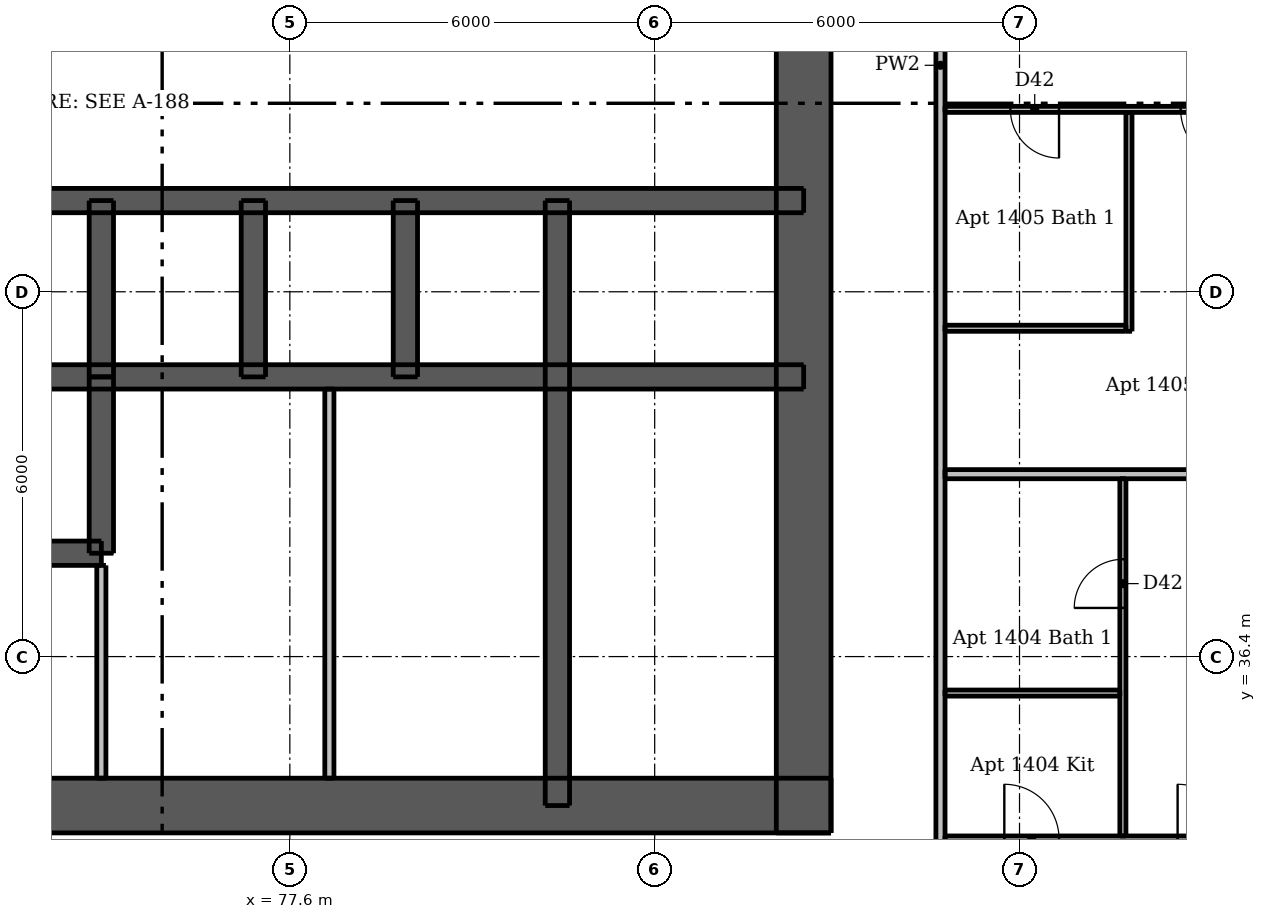
"""IFC4 building model, lengths in metres.
Left out: names, types, materials, properties, quantities, classifications, styles, units other than length and angle.
Written with IfcOpenShell. Run it as: python <this file> out.ifc"""

import sys

from ifc_helpers import new_model, si_unit, direction, frame, frame_2d, origin, place, context, subcontext, project, spatial, rectangle, extrude, element, fill, save


model = new_model("IFC4")
c1 = context("Model", 3, precision=1e-05, world=origin(), true_north=direction((0.0, 1.0)))
c2 = subcontext(c1, "Body", "Model", "MODEL_VIEW")
j1 = project(units=[si_unit("LENGTHUNIT", "METRE"), si_unit("PLANEANGLEUNIT", "RADIAN")], contexts=[c1])
p1 = place(None, origin())
s1 = spatial("IfcSite", under=j1, at=p1, CompositionType="ELEMENT")
p2 = place(p1, origin())
s2 = spatial("IfcBuilding", under=s1, at=p2, CompositionType="ELEMENT")
p3 = place(p2, frame((0.0, 0.0, 53.2)))
s3 = spatial("IfcBuildingStorey", under=s2, at=p3, CompositionType="ELEMENT", Elevation=53.2)
p4 = place(p3, frame((62.5, 33.95, 0.0), z_axis=(0.0, 0.0, 1.0), x_axis=(1.0, 0.0, 0.0)))
e1 = element("IfcWall", 1, at=p4, inside=s3, PredefinedType="SHEAR", context=c2, shape_type="SweptSolid", body=[
    extrude(rectangle(XDim=24.0, YDim=0.9, at=frame_2d((12.0, 0.0))), origin(), (0.0, 0.0, 1.0), 3.05),
])
p5 = place(p4, frame((2.05, 0.0, 0.0)))
e2 = element("IfcOpeningElement", 2, at=p5, cuts=e1, PredefinedType="OPENING", context=c2, shape_type="SweptSolid", body=[
    extrude(rectangle(XDim=1.1, YDim=2.1, at=frame_2d((0.55, 1.05))), frame((0.0, 0.46, 0.0), z_axis=(0.0, -1.0, 0.0), x_axis=(1.0, 0.0, 0.0)), (0.0, 0.0, 1.0), 0.92),
])
p6 = place(p4, frame((20.85, 0.0, 0.0)))
e3 = element("IfcOpeningElement", 3, at=p6, cuts=e1, PredefinedType="OPENING", context=c2, shape_type="SweptSolid", body=[
    extrude(rectangle(XDim=1.1, YDim=2.1, at=frame_2d((0.55, 1.05))), frame((0.0, 0.46, 0.0), z_axis=(0.0, -1.0, 0.0), x_axis=(1.0, 0.0, 0.0)), (0.0, 0.0, 1.0), 0.92),
])
p7 = place(p4, frame((8.0, 0.0, 0.0)))
e4 = element("IfcOpeningElement", 4, at=p7, cuts=e1, PredefinedType="OPENING", context=c2, shape_type="SweptSolid", body=[
    extrude(rectangle(XDim=1.1, YDim=2.1, at=frame_2d((0.55, 1.05))), frame((0.0, 0.46, 0.0), z_axis=(0.0, -1.0, 0.0), x_axis=(1.0, 0.0, 0.0)), (0.0, 0.0, 1.0), 0.92),
])
p8 = place(p4, frame((13.525, 0.0, 0.0)))
e5 = element("IfcOpeningElement", 5, at=p8, cuts=e1, PredefinedType="OPENING", context=c2, shape_type="SweptSolid", body=[
    extrude(rectangle(XDim=0.9, YDim=2.1, at=frame_2d((0.45, 1.05))), frame((0.0, 0.46, 0.0), z_axis=(0.0, -1.0, 0.0), x_axis=(1.0, 0.0, 0.0)), (0.0, 0.0, 1.0), 0.92),
])
p9 = place(p4, frame((17.075, 0.0, 0.0)))
e6 = element("IfcOpeningElement", 6, at=p9, cuts=e1, PredefinedType="OPENING", context=c2, shape_type="SweptSolid", body=[
    extrude(rectangle(XDim=0.9, YDim=2.1, at=frame_2d((0.45, 1.05))), frame((0.0, 0.46, 0.0), z_axis=(0.0, -1.0, 0.0), x_axis=(1.0, 0.0, 0.0)), (0.0, 0.0, 1.0), 0.92),
])
p10 = place(p3, frame((86.05, 33.5, 0.0), z_axis=(0.0, 0.0, 1.0), x_axis=(0.0, 1.0, 0.0)))
e7 = element("IfcWall", 7, at=p10, inside=s3, PredefinedType="SHEAR", context=c2, shape_type="SweptSolid", body=[
    extrude(rectangle(XDim=24.0, YDim=0.9, at=frame_2d((12.0, 0.0))), origin(), (0.0, 0.0, 1.0), 3.05),
])
p11 = place(p10, frame((11.2, 0.0, 0.0)))
e8 = element("IfcOpeningElement", 8, at=p11, cuts=e7, PredefinedType="OPENING", context=c2, shape_type="SweptSolid", body=[
    extrude(rectangle(XDim=1.6, YDim=2.1, at=frame_2d((0.8, 1.05))), frame((0.0, 0.46, 0.0), z_axis=(0.0, -1.0, 0.0), x_axis=(1.0, 0.0, 0.0)), (0.0, 0.0, 1.0), 0.92),
])
p12 = place(p3, frame((62.95, 41.0, 0.0), z_axis=(0.0, 0.0, 1.0), x_axis=(1.0, 0.0, 0.0)))
e9 = element("IfcWall", 9, at=p12, inside=s3, PredefinedType="SHEAR", context=c2, shape_type="SweptSolid", body=[
    extrude(rectangle(XDim=23.1, YDim=0.4, at=frame_2d((11.55, 0.0))), origin(), (0.0, 0.0, 1.0), 3.05),
])
p13 = place(p3, frame((62.95, 43.9, 0.0), z_axis=(0.0, 0.0, 1.0), x_axis=(1.0, 0.0, 0.0)))
e10 = element("IfcWall", 10, at=p13, inside=s3, PredefinedType="SHEAR", context=c2, shape_type="SweptSolid", body=[
    extrude(rectangle(XDim=23.1, YDim=0.4, at=frame_2d((11.55, 0.0))), origin(), (0.0, 0.0, 1.0), 3.05),
])
p14 = place(p13, frame((1.7, 0.0, 0.0)))
e11 = element("IfcOpeningElement", 11, at=p14, cuts=e10, PredefinedType="OPENING", context=c2, shape_type="SweptSolid", body=[
    extrude(rectangle(XDim=0.9, YDim=2.1, at=frame_2d((0.45, 1.05))), frame((0.0, 0.21, 0.0), z_axis=(0.0, -1.0, 0.0), x_axis=(1.0, 0.0, 0.0)), (0.0, 0.0, 1.0), 0.42),
])
p15 = place(p13, frame((20.5, 0.0, 0.0)))
e12 = element("IfcOpeningElement", 12, at=p15, cuts=e10, PredefinedType="OPENING", context=c2, shape_type="SweptSolid", body=[
    extrude(rectangle(XDim=0.9, YDim=2.1, at=frame_2d((0.45, 1.05))), frame((0.0, 0.21, 0.0), z_axis=(0.0, -1.0, 0.0), x_axis=(1.0, 0.0, 0.0)), (0.0, 0.0, 1.0), 0.42),
])
p16 = place(p13, frame((4.75, 0.0, 0.0)))
e13 = element("IfcOpeningElement", 13, at=p16, cuts=e10, PredefinedType="OPENING", context=c2, shape_type="SweptSolid", body=[
    extrude(rectangle(XDim=1.1, YDim=2.1, at=frame_2d((0.55, 1.05))), frame((0.0, 0.21, 0.0), z_axis=(0.0, -1.0, 0.0), x_axis=(1.0, 0.0, 0.0)), (0.0, 0.0, 1.0), 0.42),
])
p17 = place(p13, frame((7.25, 0.0, 0.0)))
e14 = element("IfcOpeningElement", 14, at=p17, cuts=e10, PredefinedType="OPENING", context=c2, shape_type="SweptSolid", body=[
    extrude(rectangle(XDim=1.1, YDim=2.1, at=frame_2d((0.55, 1.05))), frame((0.0, 0.21, 0.0), z_axis=(0.0, -1.0, 0.0), x_axis=(1.0, 0.0, 0.0)), (0.0, 0.0, 1.0), 0.42),
])
p18 = place(p13, frame((9.75, 0.0, 0.0)))
e15 = element("IfcOpeningElement", 15, at=p18, cuts=e10, PredefinedType="OPENING", context=c2, shape_type="SweptSolid", body=[
    extrude(rectangle(XDim=1.1, YDim=2.1, at=frame_2d((0.55, 1.05))), frame((0.0, 0.21, 0.0), z_axis=(0.0, -1.0, 0.0), x_axis=(1.0, 0.0, 0.0)), (0.0, 0.0, 1.0), 0.42),
])
p19 = place(p13, frame((12.25, 0.0, 0.0)))
e16 = element("IfcOpeningElement", 16, at=p19, cuts=e10, PredefinedType="OPENING", context=c2, shape_type="SweptSolid", body=[
    extrude(rectangle(XDim=1.1, YDim=2.1, at=frame_2d((0.55, 1.05))), frame((0.0, 0.21, 0.0), z_axis=(0.0, -1.0, 0.0), x_axis=(1.0, 0.0, 0.0)), (0.0, 0.0, 1.0), 0.42),
])
p20 = place(p13, frame((14.75, 0.0, 0.0)))
e17 = element("IfcOpeningElement", 17, at=p20, cuts=e10, PredefinedType="OPENING", context=c2, shape_type="SweptSolid", body=[
    extrude(rectangle(XDim=1.1, YDim=2.1, at=frame_2d((0.55, 1.05))), frame((0.0, 0.21, 0.0), z_axis=(0.0, -1.0, 0.0), x_axis=(1.0, 0.0, 0.0)), (0.0, 0.0, 1.0), 0.42),
])
p21 = place(p13, frame((17.25, 0.0, 0.0)))
e18 = element("IfcOpeningElement", 18, at=p21, cuts=e10, PredefinedType="OPENING", context=c2, shape_type="SweptSolid", body=[
    extrude(rectangle(XDim=1.1, YDim=2.1, at=frame_2d((0.55, 1.05))), frame((0.0, 0.21, 0.0), z_axis=(0.0, -1.0, 0.0), x_axis=(1.0, 0.0, 0.0)), (0.0, 0.0, 1.0), 0.42),
])
p22 = place(p3, frame((82.0, 33.95, 0.0), z_axis=(0.0, 0.0, 1.0), x_axis=(0.0, 1.0, 0.0)))
e19 = element("IfcWall", 19, at=p22, inside=s3, PredefinedType="SHEAR", context=c2, shape_type="SweptSolid", body=[
    extrude(rectangle(XDim=9.95, YDim=0.4, at=frame_2d((4.975, 0.0))), origin(), (0.0, 0.0, 1.0), 3.05),
])
for number, where, z_axis, x_axis in (
    (20, (74.5, 41.0, 0.0), (0.0, 0.0, 1.0), (0.0, 1.0, 0.0)),
    (21, (77.0, 41.0, 0.0), (0.0, 0.0, 1.0), (0.0, 1.0, 0.0)),
    (22, (79.5, 41.0, 0.0), (0.0, 0.0, 1.0), (0.0, 1.0, 0.0)),
):
    element("IfcWall", number, at=place(p3, frame(where, z_axis=z_axis, x_axis=x_axis)), inside=s3, PredefinedType="SHEAR", context=c2, shape_type="SweptSolid", body=[
        extrude(rectangle(XDim=2.9, YDim=0.4, at=frame_2d((1.45, 0.0))), origin(), (0.0, 0.0, 1.0), 3.05),
    ])
p23 = place(p3, frame((67.0, 38.1, 0.0), z_axis=(0.0, 0.0, 1.0), x_axis=(1.0, 0.0, 0.0)))
e23 = element("IfcWall", 23, at=p23, inside=s3, PredefinedType="SHEAR", context=c2, shape_type="SweptSolid", body=[
    extrude(rectangle(XDim=7.5, YDim=0.4, at=frame_2d((3.75, 0.0))), origin(), (0.0, 0.0, 1.0), 3.05),
])
p24 = place(p23, frame((0.7, 0.0, 0.0)))
e24 = element("IfcOpeningElement", 24, at=p24, cuts=e23, PredefinedType="OPENING", context=c2, shape_type="SweptSolid", body=[
    extrude(rectangle(XDim=1.1, YDim=2.1, at=frame_2d((0.55, 1.05))), frame((0.0, 0.21, 0.0), z_axis=(0.0, -1.0, 0.0), x_axis=(1.0, 0.0, 0.0)), (0.0, 0.0, 1.0), 0.42),
])
p25 = place(p23, frame((3.2, 0.0, 0.0)))
e25 = element("IfcOpeningElement", 25, at=p25, cuts=e23, PredefinedType="OPENING", context=c2, shape_type="SweptSolid", body=[
    extrude(rectangle(XDim=1.1, YDim=2.1, at=frame_2d((0.55, 1.05))), frame((0.0, 0.21, 0.0), z_axis=(0.0, -1.0, 0.0), x_axis=(1.0, 0.0, 0.0)), (0.0, 0.0, 1.0), 0.42),
])
p26 = place(p23, frame((5.65, 0.0, 0.0)))
e26 = element("IfcOpeningElement", 26, at=p26, cuts=e23, PredefinedType="OPENING", context=c2, shape_type="SweptSolid", body=[
    extrude(rectangle(XDim=1.2, YDim=2.1, at=frame_2d((0.6, 1.05))), frame((0.0, 0.21, 0.0), z_axis=(0.0, -1.0, 0.0), x_axis=(1.0, 0.0, 0.0)), (0.0, 0.0, 1.0), 0.42),
])
p27 = place(p3, frame((74.5, 38.1, 0.0), z_axis=(0.0, 0.0, 1.0), x_axis=(0.0, 1.0, 0.0)))
e27 = element("IfcWall", 27, at=p27, inside=s3, PredefinedType="SHEAR", context=c2, shape_type="SweptSolid", body=[
    extrude(rectangle(XDim=2.9, YDim=0.4, at=frame_2d((1.45, 0.0))), origin(), (0.0, 0.0, 1.0), 3.05),
])
p28 = place(p3, frame((74.5, 34.4, 0.0), z_axis=(0.0, 0.0, 1.0), x_axis=(0.0, 1.0, 0.0)))
e28 = element("IfcWall", 28, at=p28, inside=s3, PredefinedType="PLUMBINGWALL", context=c2, shape_type="SweptSolid", body=[
    extrude(rectangle(XDim=3.5, YDim=0.15, at=frame_2d((1.75, 0.0))), origin(), (0.0, 0.0, 1.0), 3.05),
])
p29 = place(p3, frame((78.25, 34.4, 0.0), z_axis=(0.0, 0.0, 1.0), x_axis=(0.0, 1.0, 0.0)))
e29 = element("IfcWall", 29, at=p29, inside=s3, PredefinedType="PLUMBINGWALL", context=c2, shape_type="SweptSolid", body=[
    extrude(rectangle(XDim=6.4, YDim=0.15, at=frame_2d((3.2, 0.0))), origin(), (0.0, 0.0, 1.0), 3.05),
])
p30 = place(p3, frame((91.3, 33.45, 0.0), z_axis=(0.0, 0.0, 1.0), x_axis=(0.0, 1.0, 0.0)))
e30 = element("IfcWall", 30, at=p30, inside=s3, PredefinedType="PARTITIONING", context=c2, shape_type="SweptSolid", body=[
    extrude(rectangle(XDim=5.875, YDim=0.1, at=frame_2d((2.938, 0.0))), origin(), (0.0, 0.0, 1.0), 3.05),
])
p31 = place(p30, frame((3.75, 0.0, 0.0)))
e31 = element("IfcOpeningElement", 31, at=p31, cuts=e30, PredefinedType="OPENING", context=c2, shape_type="SweptSolid", body=[
    extrude(rectangle(XDim=0.8, YDim=2.1, at=frame_2d((0.4, 1.05))), frame((0.0, 0.06, 0.0), z_axis=(0.0, -1.0, 0.0), x_axis=(1.0, 0.0, 0.0)), (0.0, 0.0, 1.0), 0.12),
])
p32 = place(p3, frame((91.4, 41.75, 0.0), z_axis=(0.0, 0.0, 1.0), x_axis=(0.0, 1.0, 0.0)))
e32 = element("IfcWall", 32, at=p32, inside=s3, PredefinedType="PARTITIONING", context=c2, shape_type="SweptSolid", body=[
    extrude(rectangle(XDim=3.6, YDim=0.1, at=frame_2d((1.8, 0.0))), origin(), (0.0, 0.0, 1.0), 3.05),
])
p33 = place(p3, frame((94.0, 45.4, 0.0), z_axis=(0.0, 0.0, 1.0), x_axis=(-1.0, 0.0, 0.0)))
e33 = element("IfcWall", 33, at=p33, inside=s3, PredefinedType="PARTITIONING", context=c2, shape_type="SweptSolid", body=[
    extrude(rectangle(XDim=5.625, YDim=0.1, at=frame_2d((2.812, 0.0))), origin(), (0.0, 0.0, 1.0), 3.05),
])
p34 = place(p33, frame((0.85, 0.0, 0.0)))
e34 = element("IfcOpeningElement", 34, at=p34, cuts=e33, PredefinedType="OPENING", context=c2, shape_type="SweptSolid", body=[
    extrude(rectangle(XDim=0.9, YDim=2.1, at=frame_2d((0.45, 1.05))), frame((0.0, 0.06, 0.0), z_axis=(0.0, -1.0, 0.0), x_axis=(1.0, 0.0, 0.0)), (0.0, 0.0, 1.0), 0.12),
])
p35 = place(p33, frame((3.75, 0.0, 0.0)))
e35 = element("IfcOpeningElement", 35, at=p35, cuts=e33, PredefinedType="OPENING", context=c2, shape_type="SweptSolid", body=[
    extrude(rectangle(XDim=0.8, YDim=2.1, at=frame_2d((0.4, 1.05))), frame((0.0, 0.06, 0.0), z_axis=(0.0, -1.0, 0.0), x_axis=(1.0, 0.0, 0.0)), (0.0, 0.0, 1.0), 0.12),
])
p36 = place(p3, frame((88.375, 41.8, 0.0), z_axis=(0.0, 0.0, 1.0), x_axis=(1.0, 0.0, 0.0)))
e36 = element("IfcWall", 36, at=p36, inside=s3, PredefinedType="PARTITIONING", context=c2, shape_type="SweptSolid", body=[
    extrude(rectangle(XDim=2.975, YDim=0.1, at=frame_2d((1.488, 0.0))), origin(), (0.0, 0.0, 1.0), 3.05),
])
p37 = place(p3, frame((88.375, 35.8, 0.0), z_axis=(0.0, 0.0, 1.0), x_axis=(1.0, 0.0, 0.0)))
e37 = element("IfcWall", 37, at=p37, inside=s3, PredefinedType="PARTITIONING", context=c2, shape_type="SweptSolid", body=[
    extrude(rectangle(XDim=2.875, YDim=0.1, at=frame_2d((1.438, 0.0))), origin(), (0.0, 0.0, 1.0), 3.05),
])
p38 = place(p3, frame((88.375, 33.4, 0.0), z_axis=(0.0, 0.0, 1.0), x_axis=(1.0, 0.0, 0.0)))
e38 = element("IfcWall", 38, at=p38, inside=s3, PredefinedType="PARTITIONING", context=c2, shape_type="SweptSolid", body=[
    extrude(rectangle(XDim=5.625, YDim=0.1, at=frame_2d((2.812, 0.0))), origin(), (0.0, 0.0, 1.0), 3.05),
])
p39 = place(p38, frame((0.975, 0.0, 0.0)))
e39 = element("IfcOpeningElement", 39, at=p39, cuts=e38, PredefinedType="OPENING", context=c2, shape_type="SweptSolid", body=[
    extrude(rectangle(XDim=0.9, YDim=2.1, at=frame_2d((0.45, 1.05))), frame((0.0, 0.06, 0.0), z_axis=(0.0, -1.0, 0.0), x_axis=(1.0, 0.0, 0.0)), (0.0, 0.0, 1.0), 0.12),
])
p40 = place(p38, frame((3.825, 0.0, 0.0)))
e40 = element("IfcOpeningElement", 40, at=p40, cuts=e38, PredefinedType="OPENING", context=c2, shape_type="SweptSolid", body=[
    extrude(rectangle(XDim=0.9, YDim=2.1, at=frame_2d((0.45, 1.05))), frame((0.0, 0.06, 0.0), z_axis=(0.0, -1.0, 0.0), x_axis=(1.0, 0.0, 0.0)), (0.0, 0.0, 1.0), 0.12),
])
p41 = place(p3, frame((88.3, 60.475, 0.0), z_axis=(0.0, 0.0, 1.0), x_axis=(0.0, -1.0, 0.0)))
e41 = element("IfcWall", 41, at=p41, inside=s3, PredefinedType="PARTITIONING", context=c2, shape_type="SweptSolid", body=[
    extrude(rectangle(XDim=28.7, YDim=0.15, at=frame_2d((14.35, 0.0))), origin(), (0.0, 0.0, 1.0), 3.05),
])
p42 = place(p41, frame((27.425, 0.0, 0.0)))
e42 = element("IfcOpeningElement", 42, at=p42, cuts=e41, PredefinedType="OPENING", context=c2, shape_type="SweptSolid", body=[
    extrude(rectangle(XDim=1.0, YDim=2.1, at=frame_2d((0.5, 1.05))), frame((0.0, 0.085, 0.0), z_axis=(0.0, -1.0, 0.0), x_axis=(1.0, 0.0, 0.0)), (0.0, 0.0, 1.0), 0.17),
])
p43 = place(p41, frame((11.575, 0.0, 0.0)))
e43 = element("IfcOpeningElement", 43, at=p43, cuts=e41, PredefinedType="OPENING", context=c2, shape_type="SweptSolid", body=[
    extrude(rectangle(XDim=1.0, YDim=2.1, at=frame_2d((0.5, 1.05))), frame((0.0, 0.085, 0.0), z_axis=(0.0, -1.0, 0.0), x_axis=(1.0, 0.0, 0.0)), (0.0, 0.0, 1.0), 0.17),
])
p44 = place(p41, frame((2.575, 0.0, 0.0)))
e44 = element("IfcOpeningElement", 44, at=p44, cuts=e41, PredefinedType="OPENING", context=c2, shape_type="SweptSolid", body=[
    extrude(rectangle(XDim=1.0, YDim=2.1, at=frame_2d((0.5, 1.05))), frame((0.0, 0.085, 0.0), z_axis=(0.0, -1.0, 0.0), x_axis=(1.0, 0.0, 0.0)), (0.0, 0.0, 1.0), 0.17),
])
p45 = place(p3, frame((88.375, 39.4, 0.0), z_axis=(0.0, 0.0, 1.0), x_axis=(1.0, 0.0, 0.0)))
e45 = element("IfcWall", 45, at=p45, inside=s3, PredefinedType="PARTITIONING", context=c2, shape_type="SweptSolid", body=[
    extrude(rectangle(XDim=5.625, YDim=0.15, at=frame_2d((2.812, 0.0))), origin(), (0.0, 0.0, 1.0), 3.05),
])
p46 = place(p6, origin())
e46 = element("IfcDoor", 46, at=p46, inside=s3, OperationType="SINGLE_SWING_RIGHT", PredefinedType="DOOR", context=c2, shape_type="SweptSolid", body=[
    extrude(rectangle(XDim=1.1, YDim=2.1, at=frame_2d((0.55, 1.05))), frame((0.0, 0.438, 0.0), z_axis=(0.0, -1.0, 0.0), x_axis=(1.0, 0.0, 0.0)), (0.0, 0.0, 1.0), 0.05),
])
fill(e3, e46)
p47 = place(p11, origin())
e47 = element("IfcDoor", 47, at=p47, inside=s3, OperationType="DOUBLE_DOOR_SINGLE_SWING", PredefinedType="DOOR", context=c2, shape_type="SweptSolid", body=[
    extrude(rectangle(XDim=1.6, YDim=2.1, at=frame_2d((0.8, 1.05))), frame((0.0, 0.438, 0.0), z_axis=(0.0, -1.0, 0.0), x_axis=(1.0, 0.0, 0.0)), (0.0, 0.0, 1.0), 0.05),
])
fill(e8, e47)
p48 = place(p8, origin())
e48 = element("IfcDoor", 48, at=p48, inside=s3, OperationType="SINGLE_SWING_LEFT", PredefinedType="DOOR", context=c2, shape_type="SweptSolid", body=[
    extrude(rectangle(XDim=0.9, YDim=2.1, at=frame_2d((0.45, 1.05))), frame((0.0, 0.438, 0.0), z_axis=(0.0, -1.0, 0.0), x_axis=(1.0, 0.0, 0.0)), (0.0, 0.0, 1.0), 0.05),
])
fill(e5, e48)
p49 = place(p9, origin())
e49 = element("IfcDoor", 49, at=p49, inside=s3, OperationType="SINGLE_SWING_LEFT", PredefinedType="DOOR", context=c2, shape_type="SweptSolid", body=[
    extrude(rectangle(XDim=0.9, YDim=2.1, at=frame_2d((0.45, 1.05))), frame((0.0, 0.438, 0.0), z_axis=(0.0, -1.0, 0.0), x_axis=(1.0, 0.0, 0.0)), (0.0, 0.0, 1.0), 0.05),
])
fill(e6, e49)
p50 = place(p15, origin())
e50 = element("IfcDoor", 50, at=p50, inside=s3, OperationType="SINGLE_SWING_LEFT", PredefinedType="DOOR", context=c2, shape_type="SweptSolid", body=[
    extrude(rectangle(XDim=0.9, YDim=2.1, at=frame_2d((0.45, 1.05))), frame((0.0, -0.138, 0.0), z_axis=(0.0, -1.0, 0.0), x_axis=(1.0, 0.0, 0.0)), (0.0, 0.0, 1.0), 0.05),
])
fill(e12, e50)
p51 = place(p18, origin())
e51 = element("IfcDoor", 51, at=p51, inside=s3, OperationType="DOUBLE_DOOR_SLIDING", PredefinedType="DOOR", context=c2, shape_type="SweptSolid", body=[
    extrude(rectangle(XDim=1.1, YDim=2.1, at=frame_2d((0.55, 1.05))), frame((0.0, 0.025, 0.0), z_axis=(0.0, -1.0, 0.0), x_axis=(1.0, 0.0, 0.0)), (0.0, 0.0, 1.0), 0.05),
])
fill(e15, e51)
p52 = place(p19, origin())
e52 = element("IfcDoor", 52, at=p52, inside=s3, OperationType="DOUBLE_DOOR_SLIDING", PredefinedType="DOOR", context=c2, shape_type="SweptSolid", body=[
    extrude(rectangle(XDim=1.1, YDim=2.1, at=frame_2d((0.55, 1.05))), frame((0.0, 0.025, 0.0), z_axis=(0.0, -1.0, 0.0), x_axis=(1.0, 0.0, 0.0)), (0.0, 0.0, 1.0), 0.05),
])
fill(e16, e52)
p53 = place(p20, origin())
e53 = element("IfcDoor", 53, at=p53, inside=s3, OperationType="DOUBLE_DOOR_SLIDING", PredefinedType="DOOR", context=c2, shape_type="SweptSolid", body=[
    extrude(rectangle(XDim=1.1, YDim=2.1, at=frame_2d((0.55, 1.05))), frame((0.0, 0.025, 0.0), z_axis=(0.0, -1.0, 0.0), x_axis=(1.0, 0.0, 0.0)), (0.0, 0.0, 1.0), 0.05),
])
fill(e17, e53)
p54 = place(p21, origin())
e54 = element("IfcDoor", 54, at=p54, inside=s3, OperationType="DOUBLE_DOOR_SLIDING", PredefinedType="DOOR", context=c2, shape_type="SweptSolid", body=[
    extrude(rectangle(XDim=1.1, YDim=2.1, at=frame_2d((0.55, 1.05))), frame((0.0, 0.025, 0.0), z_axis=(0.0, -1.0, 0.0), x_axis=(1.0, 0.0, 0.0)), (0.0, 0.0, 1.0), 0.05),
])
fill(e18, e54)
p55 = place(p26, origin())
e55 = element("IfcDoor", 55, at=p55, inside=s3, OperationType="DOUBLE_DOOR_SLIDING", PredefinedType="DOOR", context=c2, shape_type="SweptSolid", body=[
    extrude(rectangle(XDim=1.2, YDim=2.1, at=frame_2d((0.6, 1.05))), frame((0.0, 0.025, 0.0), z_axis=(0.0, -1.0, 0.0), x_axis=(1.0, 0.0, 0.0)), (0.0, 0.0, 1.0), 0.05),
])
fill(e26, e55)
p56 = place(p39, origin())
e56 = element("IfcDoor", 56, at=p56, inside=s3, OperationType="SINGLE_SWING_LEFT", PredefinedType="DOOR", context=c2, shape_type="SweptSolid", body=[
    extrude(rectangle(XDim=0.9, YDim=2.1, at=frame_2d((0.45, 1.05))), frame((0.0, 0.025, 0.0), z_axis=(0.0, -1.0, 0.0), x_axis=(1.0, 0.0, 0.0)), (0.0, 0.0, 1.0), 0.05),
])
fill(e39, e56)
p57 = place(p40, origin())
e57 = element("IfcDoor", 57, at=p57, inside=s3, OperationType="SINGLE_SWING_LEFT", PredefinedType="DOOR", context=c2, shape_type="SweptSolid", body=[
    extrude(rectangle(XDim=0.9, YDim=2.1, at=frame_2d((0.45, 1.05))), frame((0.0, 0.025, 0.0), z_axis=(0.0, -1.0, 0.0), x_axis=(1.0, 0.0, 0.0)), (0.0, 0.0, 1.0), 0.05),
])
fill(e40, e57)
p58 = place(p31, origin())
e58 = element("IfcDoor", 58, at=p58, inside=s3, OperationType="SINGLE_SWING_LEFT", PredefinedType="DOOR", context=c2, shape_type="SweptSolid", body=[
    extrude(rectangle(XDim=0.8, YDim=2.1, at=frame_2d((0.4, 1.05))), frame((0.0, 0.025, 0.0), z_axis=(0.0, -1.0, 0.0), x_axis=(1.0, 0.0, 0.0)), (0.0, 0.0, 1.0), 0.05),
])
fill(e31, e58)
p59 = place(p34, origin())
e59 = element("IfcDoor", 59, at=p59, inside=s3, OperationType="SINGLE_SWING_LEFT", PredefinedType="DOOR", context=c2, shape_type="SweptSolid", body=[
    extrude(rectangle(XDim=0.9, YDim=2.1, at=frame_2d((0.45, 1.05))), frame((0.0, 0.025, 0.0), z_axis=(0.0, -1.0, 0.0), x_axis=(1.0, 0.0, 0.0)), (0.0, 0.0, 1.0), 0.05),
])
fill(e34, e59)
p60 = place(p35, origin())
e60 = element("IfcDoor", 60, at=p60, inside=s3, OperationType="SINGLE_SWING_LEFT", PredefinedType="DOOR", context=c2, shape_type="SweptSolid", body=[
    extrude(rectangle(XDim=0.8, YDim=2.1, at=frame_2d((0.4, 1.05))), frame((0.0, 0.025, 0.0), z_axis=(0.0, -1.0, 0.0), x_axis=(1.0, 0.0, 0.0)), (0.0, 0.0, 1.0), 0.05),
])
fill(e35, e60)
save(model, sys.argv[1])
